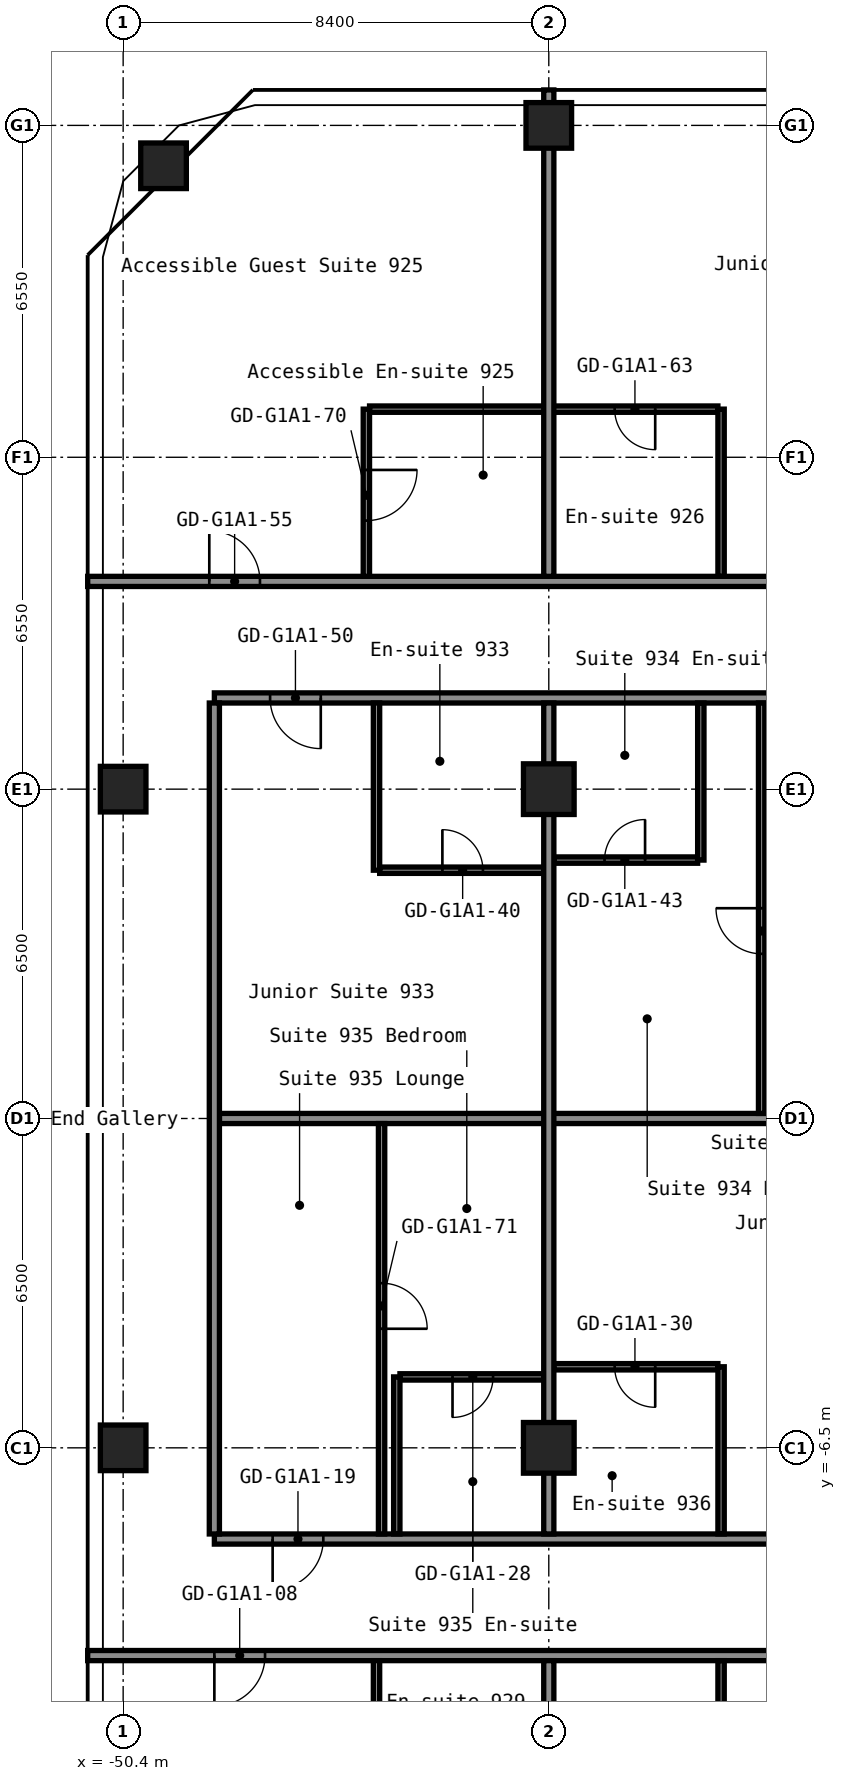
"""IFC4 building model, lengths in metres.
Left out: names, types, materials, properties, quantities, classifications, styles, units other than length and angle.
Written with IfcOpenShell. Run it as: python <this file> out.ifc"""

import sys

from ifc_helpers import new_model, si_unit, direction, frame, frame_2d, origin, origin_2d, place, context, subcontext, project, spatial, rectangle, hollow_rectangle, extrude, element, fill, save


model = new_model("IFC4")
c1 = context("Model", 3, precision=1e-05, world=origin(), true_north=direction((0.0, 1.0)))
c2 = subcontext(c1, "Body", "Model", "MODEL_VIEW")
j1 = project(units=[si_unit("LENGTHUNIT", "METRE"), si_unit("PLANEANGLEUNIT", "RADIAN")], contexts=[c1])
p1 = place(None, origin())
s1 = spatial("IfcSite", under=j1, at=p1, CompositionType="ELEMENT")
p2 = place(p1, origin())
s2 = spatial("IfcBuilding", under=s1, at=p2, CompositionType="ELEMENT")
p3 = place(p2, frame((0.0, 0.0, 35.8)))
s3 = spatial("IfcBuildingStorey", under=s2, at=p3, CompositionType="ELEMENT", Elevation=35.8)
for number, where, z_axis, x_axis in (
    (1, (-50.4, -6.5, 0.0), (0.0, 0.0, 1.0), (1.0, 0.0, 0.0)),
    (2, (-50.4, 6.5, 0.0), (0.0, 0.0, 1.0), (1.0, 0.0, 0.0)),
    (3, (-49.603, 18.803, 0.0), (0.0, 0.0, 1.0), (1.0, 0.0, 0.0)),
):
    element("IfcColumn", number, at=place(p3, frame(where, z_axis=z_axis, x_axis=x_axis)), inside=s3, PredefinedType="COLUMN", context=c2, shape_type="SweptSolid", body=[
        extrude(hollow_rectangle(XDim=0.9, YDim=0.9, WallThickness=0.036, at=origin_2d()), origin(), (0.0, 0.0, 1.0), 2.8),
    ])
for number, where, z_axis, x_axis in (
    (4, (-42.0, -6.5, 0.0), (0.0, 0.0, 1.0), (1.0, 0.0, 0.0)),
    (5, (-42.0, 6.5, 0.0), (0.0, 0.0, 1.0), (1.0, 0.0, 0.0)),
):
    element("IfcColumn", number, at=place(p3, frame(where, z_axis=z_axis, x_axis=x_axis)), inside=s3, PredefinedType="COLUMN", context=c2, shape_type="SweptSolid", body=[
        extrude(hollow_rectangle(XDim=1.0, YDim=1.0, WallThickness=0.04, at=origin_2d()), origin(), (0.0, 0.0, 1.0), 2.8),
    ])
p4 = place(p3, frame((-42.0, 19.6, 0.0), z_axis=(0.0, 0.0, 1.0), x_axis=(1.0, 0.0, 0.0)))
e6 = element("IfcColumn", 6, at=p4, inside=s3, PredefinedType="COLUMN", context=c2, shape_type="SweptSolid", body=[
    extrude(hollow_rectangle(XDim=0.9, YDim=0.9, WallThickness=0.036, at=origin_2d()), origin(), (0.0, 0.0, 1.0), 2.8),
])
p5 = place(p3, frame((-51.1, -10.6, 0.0), z_axis=(0.0, 0.0, 1.0), x_axis=(1.0, 0.0, 0.0)))
e7 = element("IfcWall", 7, at=p5, inside=s3, PredefinedType="PARTITIONING", context=c2, shape_type="SweptSolid", body=[
    extrude(rectangle(XDim=34.3, YDim=0.2, at=frame_2d((17.15, 0.0))), origin(), (0.0, 0.0, 1.0), 2.8),
])
p6 = place(p5, frame((2.5, 0.0, 0.0)))
e8 = element("IfcOpeningElement", 8, at=p6, cuts=e7, PredefinedType="OPENING", context=c2, shape_type="SweptSolid", body=[
    extrude(rectangle(XDim=1.0, YDim=2.1, at=frame_2d((0.5, 1.05))), frame((0.0, 0.11, 0.0), z_axis=(0.0, -1.0, 0.0), x_axis=(1.0, 0.0, 0.0)), (0.0, 0.0, 1.0), 0.22),
])
p7 = place(p5, frame((14.5, 0.0, 0.0)))
e9 = element("IfcOpeningElement", 9, at=p7, cuts=e7, PredefinedType="OPENING", context=c2, shape_type="SweptSolid", body=[
    extrude(rectangle(XDim=1.0, YDim=2.1, at=frame_2d((0.5, 1.05))), frame((0.0, 0.11, 0.0), z_axis=(0.0, -1.0, 0.0), x_axis=(1.0, 0.0, 0.0)), (0.0, 0.0, 1.0), 0.22),
])
p8 = place(p5, frame((19.4, 0.0, 0.0)))
e10 = element("IfcOpeningElement", 10, at=p8, cuts=e7, PredefinedType="OPENING", context=c2, shape_type="SweptSolid", body=[
    extrude(rectangle(XDim=1.0, YDim=2.1, at=frame_2d((0.5, 1.05))), frame((0.0, 0.11, 0.0), z_axis=(0.0, -1.0, 0.0), x_axis=(1.0, 0.0, 0.0)), (0.0, 0.0, 1.0), 0.22),
])
p9 = place(p5, frame((27.9, 0.0, 0.0)))
e11 = element("IfcOpeningElement", 11, at=p9, cuts=e7, PredefinedType="OPENING", context=c2, shape_type="SweptSolid", body=[
    extrude(rectangle(XDim=1.0, YDim=2.1, at=frame_2d((0.5, 1.05))), frame((0.0, 0.11, 0.0), z_axis=(0.0, -1.0, 0.0), x_axis=(1.0, 0.0, 0.0)), (0.0, 0.0, 1.0), 0.22),
])
p10 = place(p3, frame((-48.6, -8.3, 0.0), z_axis=(0.0, 0.0, 1.0), x_axis=(1.0, 0.0, 0.0)))
e12 = element("IfcWall", 12, at=p10, inside=s3, PredefinedType="PARTITIONING", context=c2, shape_type="SweptSolid", body=[
    extrude(rectangle(XDim=15.0, YDim=0.2, at=frame_2d((7.5, 0.0))), origin(), (0.0, 0.0, 1.0), 2.8),
])
p11 = place(p10, frame((1.15, 0.0, 0.0)))
e13 = element("IfcOpeningElement", 13, at=p11, cuts=e12, PredefinedType="OPENING", context=c2, shape_type="SweptSolid", body=[
    extrude(rectangle(XDim=1.0, YDim=2.1, at=frame_2d((0.5, 1.05))), frame((0.0, 0.11, 0.0), z_axis=(0.0, -1.0, 0.0), x_axis=(1.0, 0.0, 0.0)), (0.0, 0.0, 1.0), 0.22),
])
p12 = place(p10, frame((12.0, 0.0, 0.0)))
e14 = element("IfcOpeningElement", 14, at=p12, cuts=e12, PredefinedType="OPENING", context=c2, shape_type="SweptSolid", body=[
    extrude(rectangle(XDim=1.0, YDim=2.1, at=frame_2d((0.5, 1.05))), frame((0.0, 0.11, 0.0), z_axis=(0.0, -1.0, 0.0), x_axis=(1.0, 0.0, 0.0)), (0.0, 0.0, 1.0), 0.22),
])
p13 = place(p3, frame((-44.938, -5.1, 0.0), z_axis=(0.0, 0.0, 1.0), x_axis=(1.0, 0.0, 0.0)))
e15 = element("IfcWall", 15, at=p13, inside=s3, PredefinedType="PARTITIONING", context=c2, shape_type="SweptSolid", body=[
    extrude(rectangle(XDim=2.837, YDim=0.125, at=frame_2d((1.419, 0.0))), origin(), (0.0, 0.0, 1.0), 2.8),
])
p14 = place(p13, frame((1.038, 0.0, 0.0)))
e16 = element("IfcOpeningElement", 16, at=p14, cuts=e15, PredefinedType="OPENING", context=c2, shape_type="SweptSolid", body=[
    extrude(rectangle(XDim=0.8, YDim=2.1, at=frame_2d((0.4, 1.05))), frame((0.0, 0.073, 0.0), z_axis=(0.0, -1.0, 0.0), x_axis=(1.0, 0.0, 0.0)), (0.0, 0.0, 1.0), 0.145),
])
p15 = place(p3, frame((-41.9, -4.9, 0.0), z_axis=(0.0, 0.0, 1.0), x_axis=(1.0, 0.0, 0.0)))
e17 = element("IfcWall", 17, at=p15, inside=s3, PredefinedType="PARTITIONING", context=c2, shape_type="SweptSolid", body=[
    extrude(rectangle(XDim=3.237, YDim=0.125, at=frame_2d((1.619, 0.0))), origin(), (0.0, 0.0, 1.0), 2.8),
])
p16 = place(p15, frame((1.2, 0.0, 0.0)))
e18 = element("IfcOpeningElement", 18, at=p16, cuts=e17, PredefinedType="OPENING", context=c2, shape_type="SweptSolid", body=[
    extrude(rectangle(XDim=0.8, YDim=2.1, at=frame_2d((0.4, 1.05))), frame((0.0, 0.073, 0.0), z_axis=(0.0, -1.0, 0.0), x_axis=(1.0, 0.0, 0.0)), (0.0, 0.0, 1.0), 0.145),
])
p17 = place(p3, frame((-48.5, 0.0, 0.0), z_axis=(0.0, 0.0, 1.0), x_axis=(1.0, 0.0, 0.0)))
e19 = element("IfcWall", 19, at=p17, inside=s3, PredefinedType="PARTITIONING", context=c2, shape_type="SweptSolid", body=[
    extrude(rectangle(XDim=14.9, YDim=0.2, at=frame_2d((7.45, 0.0))), origin(), (0.0, 0.0, 1.0), 2.8),
])
p18 = place(p3, frame((-45.337, 4.9, 0.0), z_axis=(0.0, 0.0, 1.0), x_axis=(1.0, 0.0, 0.0)))
e20 = element("IfcWall", 20, at=p18, inside=s3, PredefinedType="PARTITIONING", context=c2, shape_type="SweptSolid", body=[
    extrude(rectangle(XDim=3.237, YDim=0.125, at=frame_2d((1.619, 0.0))), origin(), (0.0, 0.0, 1.0), 2.8),
])
p19 = place(p18, frame((1.238, 0.0, 0.0)))
e21 = element("IfcOpeningElement", 21, at=p19, cuts=e20, PredefinedType="OPENING", context=c2, shape_type="SweptSolid", body=[
    extrude(rectangle(XDim=0.8, YDim=2.1, at=frame_2d((0.4, 1.05))), frame((0.0, 0.073, 0.0), z_axis=(0.0, -1.0, 0.0), x_axis=(1.0, 0.0, 0.0)), (0.0, 0.0, 1.0), 0.145),
])
p20 = place(p3, frame((-41.9, 5.1, 0.0), z_axis=(0.0, 0.0, 1.0), x_axis=(1.0, 0.0, 0.0)))
e22 = element("IfcWall", 22, at=p20, inside=s3, PredefinedType="PARTITIONING", context=c2, shape_type="SweptSolid", body=[
    extrude(rectangle(XDim=2.837, YDim=0.125, at=frame_2d((1.419, 0.0))), origin(), (0.0, 0.0, 1.0), 2.8),
])
p21 = place(p20, frame((1.0, 0.0, 0.0)))
e23 = element("IfcOpeningElement", 23, at=p21, cuts=e22, PredefinedType="OPENING", context=c2, shape_type="SweptSolid", body=[
    extrude(rectangle(XDim=0.8, YDim=2.1, at=frame_2d((0.4, 1.05))), frame((0.0, 0.073, 0.0), z_axis=(0.0, -1.0, 0.0), x_axis=(1.0, 0.0, 0.0)), (0.0, 0.0, 1.0), 0.145),
])
p22 = place(p3, frame((-48.6, 8.3, 0.0), z_axis=(0.0, 0.0, 1.0), x_axis=(1.0, 0.0, 0.0)))
e24 = element("IfcWall", 24, at=p22, inside=s3, PredefinedType="PARTITIONING", context=c2, shape_type="SweptSolid", body=[
    extrude(rectangle(XDim=15.0, YDim=0.2, at=frame_2d((7.5, 0.0))), origin(), (0.0, 0.0, 1.0), 2.8),
])
p23 = place(p22, frame((1.1, 0.0, 0.0)))
e25 = element("IfcOpeningElement", 25, at=p23, cuts=e24, PredefinedType="OPENING", context=c2, shape_type="SweptSolid", body=[
    extrude(rectangle(XDim=1.0, YDim=2.1, at=frame_2d((0.5, 1.05))), frame((0.0, 0.11, 0.0), z_axis=(0.0, -1.0, 0.0), x_axis=(1.0, 0.0, 0.0)), (0.0, 0.0, 1.0), 0.22),
])
p24 = place(p22, frame((12.4, 0.0, 0.0)))
e26 = element("IfcOpeningElement", 26, at=p24, cuts=e24, PredefinedType="OPENING", context=c2, shape_type="SweptSolid", body=[
    extrude(rectangle(XDim=1.0, YDim=2.1, at=frame_2d((0.5, 1.05))), frame((0.0, 0.11, 0.0), z_axis=(0.0, -1.0, 0.0), x_axis=(1.0, 0.0, 0.0)), (0.0, 0.0, 1.0), 0.22),
])
p25 = place(p3, frame((-51.1, 10.6, 0.0), z_axis=(0.0, 0.0, 1.0), x_axis=(1.0, 0.0, 0.0)))
e27 = element("IfcWall", 27, at=p25, inside=s3, PredefinedType="PARTITIONING", context=c2, shape_type="SweptSolid", body=[
    extrude(rectangle(XDim=34.3, YDim=0.2, at=frame_2d((17.15, 0.0))), origin(), (0.0, 0.0, 1.0), 2.8),
])
p26 = place(p25, frame((2.4, 0.0, 0.0)))
e28 = element("IfcOpeningElement", 28, at=p26, cuts=e27, PredefinedType="OPENING", context=c2, shape_type="SweptSolid", body=[
    extrude(rectangle(XDim=1.0, YDim=2.1, at=frame_2d((0.5, 1.05))), frame((0.0, 0.11, 0.0), z_axis=(0.0, -1.0, 0.0), x_axis=(1.0, 0.0, 0.0)), (0.0, 0.0, 1.0), 0.22),
])
p27 = place(p25, frame((14.5, 0.0, 0.0)))
e29 = element("IfcOpeningElement", 29, at=p27, cuts=e27, PredefinedType="OPENING", context=c2, shape_type="SweptSolid", body=[
    extrude(rectangle(XDim=1.0, YDim=2.1, at=frame_2d((0.5, 1.05))), frame((0.0, 0.11, 0.0), z_axis=(0.0, -1.0, 0.0), x_axis=(1.0, 0.0, 0.0)), (0.0, 0.0, 1.0), 0.22),
])
p28 = place(p25, frame((19.5, 0.0, 0.0)))
e30 = element("IfcOpeningElement", 30, at=p28, cuts=e27, PredefinedType="OPENING", context=c2, shape_type="SweptSolid", body=[
    extrude(rectangle(XDim=1.0, YDim=2.1, at=frame_2d((0.5, 1.05))), frame((0.0, 0.11, 0.0), z_axis=(0.0, -1.0, 0.0), x_axis=(1.0, 0.0, 0.0)), (0.0, 0.0, 1.0), 0.22),
])
p29 = place(p25, frame((31.3, 0.0, 0.0)))
e31 = element("IfcOpeningElement", 31, at=p29, cuts=e27, PredefinedType="OPENING", context=c2, shape_type="SweptSolid", body=[
    extrude(rectangle(XDim=1.0, YDim=2.1, at=frame_2d((0.5, 1.05))), frame((0.0, 0.11, 0.0), z_axis=(0.0, -1.0, 0.0), x_axis=(1.0, 0.0, 0.0)), (0.0, 0.0, 1.0), 0.22),
])
p30 = place(p3, frame((-45.538, 14.0, 0.0), z_axis=(0.0, 0.0, 1.0), x_axis=(1.0, 0.0, 0.0)))
e32 = element("IfcWall", 32, at=p30, inside=s3, PredefinedType="PARTITIONING", context=c2, shape_type="SweptSolid", body=[
    extrude(rectangle(XDim=6.875, YDim=0.125, at=frame_2d((3.438, 0.0))), origin(), (0.0, 0.0, 1.0), 2.8),
])
p31 = place(p30, frame((4.837, 0.0, 0.0)))
e33 = element("IfcOpeningElement", 33, at=p31, cuts=e32, PredefinedType="OPENING", context=c2, shape_type="SweptSolid", body=[
    extrude(rectangle(XDim=0.8, YDim=2.1, at=frame_2d((0.4, 1.05))), frame((0.0, 0.073, 0.0), z_axis=(0.0, -1.0, 0.0), x_axis=(1.0, 0.0, 0.0)), (0.0, 0.0, 1.0), 0.145),
])
p32 = place(p3, frame((-48.6, -8.2, 0.0), z_axis=(0.0, 0.0, 1.0), x_axis=(0.0, 1.0, 0.0)))
e34 = element("IfcWall", 34, at=p32, inside=s3, PredefinedType="PARTITIONING", context=c2, shape_type="SweptSolid", body=[
    extrude(rectangle(XDim=16.4, YDim=0.2, at=frame_2d((8.2, 0.0))), origin(), (0.0, 0.0, 1.0), 2.8),
])
p33 = place(p3, frame((-45.6, 10.7, 0.0), z_axis=(0.0, 0.0, 1.0), x_axis=(0.0, 1.0, 0.0)))
e35 = element("IfcWall", 35, at=p33, inside=s3, PredefinedType="PARTITIONING", context=c2, shape_type="SweptSolid", body=[
    extrude(rectangle(XDim=3.3, YDim=0.125, at=frame_2d((1.65, 0.0))), origin(), (0.0, 0.0, 1.0), 2.8),
])
p34 = place(p33, frame((1.1, 0.0, 0.0)))
e36 = element("IfcOpeningElement", 36, at=p34, cuts=e35, PredefinedType="OPENING", context=c2, shape_type="SweptSolid", body=[
    extrude(rectangle(XDim=1.0, YDim=2.1, at=frame_2d((0.5, 1.05))), frame((0.0, 0.073, 0.0), z_axis=(0.0, -1.0, 0.0), x_axis=(1.0, 0.0, 0.0)), (0.0, 0.0, 1.0), 0.145),
])
for number, where, z_axis, x_axis in (
    (37, (-45.4, -14.0, 0.0), (0.0, 0.0, 1.0), (0.0, 1.0, 0.0)),
    (38, (-45.4, 4.9, 0.0), (0.0, 0.0, 1.0), (0.0, 1.0, 0.0)),
):
    element("IfcWall", number, at=place(p3, frame(where, z_axis=z_axis, x_axis=x_axis)), inside=s3, PredefinedType="PARTITIONING", context=c2, shape_type="SweptSolid", body=[
        extrude(rectangle(XDim=3.3, YDim=0.125, at=frame_2d((1.65, 0.0))), origin(), (0.0, 0.0, 1.0), 2.8),
    ])
p35 = place(p3, frame((-45.3, -8.2, 0.0), z_axis=(0.0, 0.0, 1.0), x_axis=(0.0, 1.0, 0.0)))
e39 = element("IfcWall", 39, at=p35, inside=s3, PredefinedType="PARTITIONING", context=c2, shape_type="SweptSolid", body=[
    extrude(rectangle(XDim=8.1, YDim=0.125, at=frame_2d((4.05, 0.0))), origin(), (0.0, 0.0, 1.0), 2.8),
])
p36 = place(p35, frame((4.05, 0.0, 0.0)))
e40 = element("IfcOpeningElement", 40, at=p36, cuts=e39, PredefinedType="OPENING", context=c2, shape_type="SweptSolid", body=[
    extrude(rectangle(XDim=0.9, YDim=2.1, at=frame_2d((0.45, 1.05))), frame((0.0, 0.073, 0.0), z_axis=(0.0, -1.0, 0.0), x_axis=(1.0, 0.0, 0.0)), (0.0, 0.0, 1.0), 0.145),
])
p37 = place(p3, frame((-45.0, -8.2, 0.0), z_axis=(0.0, 0.0, 1.0), x_axis=(0.0, 1.0, 0.0)))
e41 = element("IfcWall", 41, at=p37, inside=s3, PredefinedType="PARTITIONING", context=c2, shape_type="SweptSolid", body=[
    extrude(rectangle(XDim=3.1, YDim=0.125, at=frame_2d((1.55, 0.0))), origin(), (0.0, 0.0, 1.0), 2.8),
])
p38 = place(p3, frame((-42.0, -20.3, 0.0), z_axis=(0.0, 0.0, 1.0), x_axis=(0.0, 1.0, 0.0)))
e42 = element("IfcWall", 42, at=p38, inside=s3, PredefinedType="PARTITIONING", context=c2, shape_type="SweptSolid", body=[
    extrude(rectangle(XDim=9.6, YDim=0.2, at=frame_2d((4.8, 0.0))), origin(), (0.0, 0.0, 1.0), 2.8),
])
p39 = place(p3, frame((-42.0, -8.2, 0.0), z_axis=(0.0, 0.0, 1.0), x_axis=(0.0, 1.0, 0.0)))
e43 = element("IfcWall", 43, at=p39, inside=s3, PredefinedType="PARTITIONING", context=c2, shape_type="SweptSolid", body=[
    extrude(rectangle(XDim=16.4, YDim=0.2, at=frame_2d((8.2, 0.0))), origin(), (0.0, 0.0, 1.0), 2.8),
])
p40 = place(p3, frame((-42.0, 10.7, 0.0), z_axis=(0.0, 0.0, 1.0), x_axis=(0.0, 1.0, 0.0)))
e44 = element("IfcWall", 44, at=p40, inside=s3, PredefinedType="PARTITIONING", context=c2, shape_type="SweptSolid", body=[
    extrude(rectangle(XDim=9.6, YDim=0.2, at=frame_2d((4.8, 0.0))), origin(), (0.0, 0.0, 1.0), 2.8),
])
p41 = place(p3, frame((-39.0, 5.1, 0.0), z_axis=(0.0, 0.0, 1.0), x_axis=(0.0, 1.0, 0.0)))
e45 = element("IfcWall", 45, at=p41, inside=s3, PredefinedType="PARTITIONING", context=c2, shape_type="SweptSolid", body=[
    extrude(rectangle(XDim=3.1, YDim=0.125, at=frame_2d((1.55, 0.0))), origin(), (0.0, 0.0, 1.0), 2.8),
])
for number, where, z_axis, x_axis in (
    (46, (-38.6, -14.0, 0.0), (0.0, 0.0, 1.0), (0.0, 1.0, 0.0)),
    (47, (-38.6, -8.2, 0.0), (0.0, 0.0, 1.0), (0.0, 1.0, 0.0)),
    (48, (-38.6, 10.7, 0.0), (0.0, 0.0, 1.0), (0.0, 1.0, 0.0)),
):
    element("IfcWall", number, at=place(p3, frame(where, z_axis=z_axis, x_axis=x_axis)), inside=s3, PredefinedType="PARTITIONING", context=c2, shape_type="SweptSolid", body=[
        extrude(rectangle(XDim=3.3, YDim=0.125, at=frame_2d((1.65, 0.0))), origin(), (0.0, 0.0, 1.0), 2.8),
    ])
p42 = place(p3, frame((-37.8, 0.1, 0.0), z_axis=(0.0, 0.0, 1.0), x_axis=(0.0, 1.0, 0.0)))
e49 = element("IfcWall", 49, at=p42, inside=s3, PredefinedType="PARTITIONING", context=c2, shape_type="SweptSolid", body=[
    extrude(rectangle(XDim=8.1, YDim=0.125, at=frame_2d((4.05, 0.0))), origin(), (0.0, 0.0, 1.0), 2.8),
])
p43 = place(p42, frame((3.15, 0.0, 0.0)))
e50 = element("IfcOpeningElement", 50, at=p43, cuts=e49, PredefinedType="OPENING", context=c2, shape_type="SweptSolid", body=[
    extrude(rectangle(XDim=0.9, YDim=2.1, at=frame_2d((0.45, 1.05))), frame((0.0, 0.073, 0.0), z_axis=(0.0, -1.0, 0.0), x_axis=(1.0, 0.0, 0.0)), (0.0, 0.0, 1.0), 0.145),
])
p44 = place(p6, origin())
e51 = element("IfcDoor", 51, at=p44, inside=s3, OperationType="SINGLE_SWING_LEFT", PredefinedType="DOOR", context=c2, shape_type="SweptSolid", body=[
    extrude(rectangle(XDim=1.0, YDim=2.1, at=frame_2d((0.5, 1.05))), frame((0.0, 0.025, 0.0), z_axis=(0.0, -1.0, 0.0), x_axis=(1.0, 0.0, 0.0)), (0.0, 0.0, 1.0), 0.05),
])
fill(e8, e51)
p45 = place(p11, origin())
e52 = element("IfcDoor", 52, at=p45, inside=s3, OperationType="SINGLE_SWING_LEFT", PredefinedType="DOOR", context=c2, shape_type="SweptSolid", body=[
    extrude(rectangle(XDim=1.0, YDim=2.1, at=frame_2d((0.5, 1.05))), frame((0.0, 0.025, 0.0), z_axis=(0.0, -1.0, 0.0), x_axis=(1.0, 0.0, 0.0)), (0.0, 0.0, 1.0), 0.05),
])
fill(e13, e52)
p46 = place(p14, origin())
e53 = element("IfcDoor", 53, at=p46, inside=s3, OperationType="SINGLE_SWING_LEFT", PredefinedType="DOOR", context=c2, shape_type="SweptSolid", body=[
    extrude(rectangle(XDim=0.8, YDim=2.1, at=frame_2d((0.4, 1.05))), frame((0.0, 0.025, 0.0), z_axis=(0.0, -1.0, 0.0), x_axis=(1.0, 0.0, 0.0)), (0.0, 0.0, 1.0), 0.05),
])
fill(e16, e53)
p47 = place(p16, origin())
e54 = element("IfcDoor", 54, at=p47, inside=s3, OperationType="SINGLE_SWING_RIGHT", PredefinedType="DOOR", context=c2, shape_type="SweptSolid", body=[
    extrude(rectangle(XDim=0.8, YDim=2.1, at=frame_2d((0.4, 1.05))), frame((0.0, 0.025, 0.0), z_axis=(0.0, -1.0, 0.0), x_axis=(1.0, 0.0, 0.0)), (0.0, 0.0, 1.0), 0.05),
])
fill(e18, e54)
p48 = place(p19, origin())
e55 = element("IfcDoor", 55, at=p48, inside=s3, OperationType="SINGLE_SWING_RIGHT", PredefinedType="DOOR", context=c2, shape_type="SweptSolid", body=[
    extrude(rectangle(XDim=0.8, YDim=2.1, at=frame_2d((0.4, 1.05))), frame((0.0, 0.025, 0.0), z_axis=(0.0, -1.0, 0.0), x_axis=(1.0, 0.0, 0.0)), (0.0, 0.0, 1.0), 0.05),
])
fill(e21, e55)
p49 = place(p21, origin())
e56 = element("IfcDoor", 56, at=p49, inside=s3, OperationType="SINGLE_SWING_LEFT", PredefinedType="DOOR", context=c2, shape_type="SweptSolid", body=[
    extrude(rectangle(XDim=0.8, YDim=2.1, at=frame_2d((0.4, 1.05))), frame((0.0, 0.025, 0.0), z_axis=(0.0, -1.0, 0.0), x_axis=(1.0, 0.0, 0.0)), (0.0, 0.0, 1.0), 0.05),
])
fill(e23, e56)
p50 = place(p23, origin())
e57 = element("IfcDoor", 57, at=p50, inside=s3, OperationType="SINGLE_SWING_RIGHT", PredefinedType="DOOR", context=c2, shape_type="SweptSolid", body=[
    extrude(rectangle(XDim=1.0, YDim=2.1, at=frame_2d((0.5, 1.05))), frame((0.0, 0.025, 0.0), z_axis=(0.0, -1.0, 0.0), x_axis=(1.0, 0.0, 0.0)), (0.0, 0.0, 1.0), 0.05),
])
fill(e25, e57)
p51 = place(p26, origin())
e58 = element("IfcDoor", 58, at=p51, inside=s3, OperationType="SINGLE_SWING_RIGHT", PredefinedType="DOOR", context=c2, shape_type="SweptSolid", body=[
    extrude(rectangle(XDim=1.0, YDim=2.1, at=frame_2d((0.5, 1.05))), frame((0.0, 0.025, 0.0), z_axis=(0.0, -1.0, 0.0), x_axis=(1.0, 0.0, 0.0)), (0.0, 0.0, 1.0), 0.05),
])
fill(e28, e58)
p52 = place(p31, origin())
e59 = element("IfcDoor", 59, at=p52, inside=s3, OperationType="SINGLE_SWING_RIGHT", PredefinedType="DOOR", context=c2, shape_type="SweptSolid", body=[
    extrude(rectangle(XDim=0.8, YDim=2.1, at=frame_2d((0.4, 1.05))), frame((0.0, 0.025, 0.0), z_axis=(0.0, -1.0, 0.0), x_axis=(1.0, 0.0, 0.0)), (0.0, 0.0, 1.0), 0.05),
])
fill(e33, e59)
p53 = place(p34, origin())
e60 = element("IfcDoor", 60, at=p53, inside=s3, OperationType="SINGLE_SWING_RIGHT", PredefinedType="DOOR", context=c2, shape_type="SweptSolid", body=[
    extrude(rectangle(XDim=1.0, YDim=2.1, at=frame_2d((0.5, 1.05))), frame((0.0, 0.025, 0.0), z_axis=(0.0, -1.0, 0.0), x_axis=(1.0, 0.0, 0.0)), (0.0, 0.0, 1.0), 0.05),
])
fill(e36, e60)
p54 = place(p36, origin())
e61 = element("IfcDoor", 61, at=p54, inside=s3, OperationType="SINGLE_SWING_LEFT", PredefinedType="DOOR", context=c2, shape_type="SweptSolid", body=[
    extrude(rectangle(XDim=0.9, YDim=2.1, at=frame_2d((0.45, 1.05))), frame((0.0, 0.025, 0.0), z_axis=(0.0, -1.0, 0.0), x_axis=(1.0, 0.0, 0.0)), (0.0, 0.0, 1.0), 0.05),
])
fill(e40, e61)
p55 = place(p43, origin())
e62 = element("IfcDoor", 62, at=p55, inside=s3, OperationType="SINGLE_SWING_LEFT", PredefinedType="DOOR", context=c2, shape_type="SweptSolid", body=[
    extrude(rectangle(XDim=0.9, YDim=2.1, at=frame_2d((0.45, 1.05))), frame((0.0, 0.025, 0.0), z_axis=(0.0, -1.0, 0.0), x_axis=(1.0, 0.0, 0.0)), (0.0, 0.0, 1.0), 0.05),
])
fill(e50, e62)
save(model, sys.argv[1])
